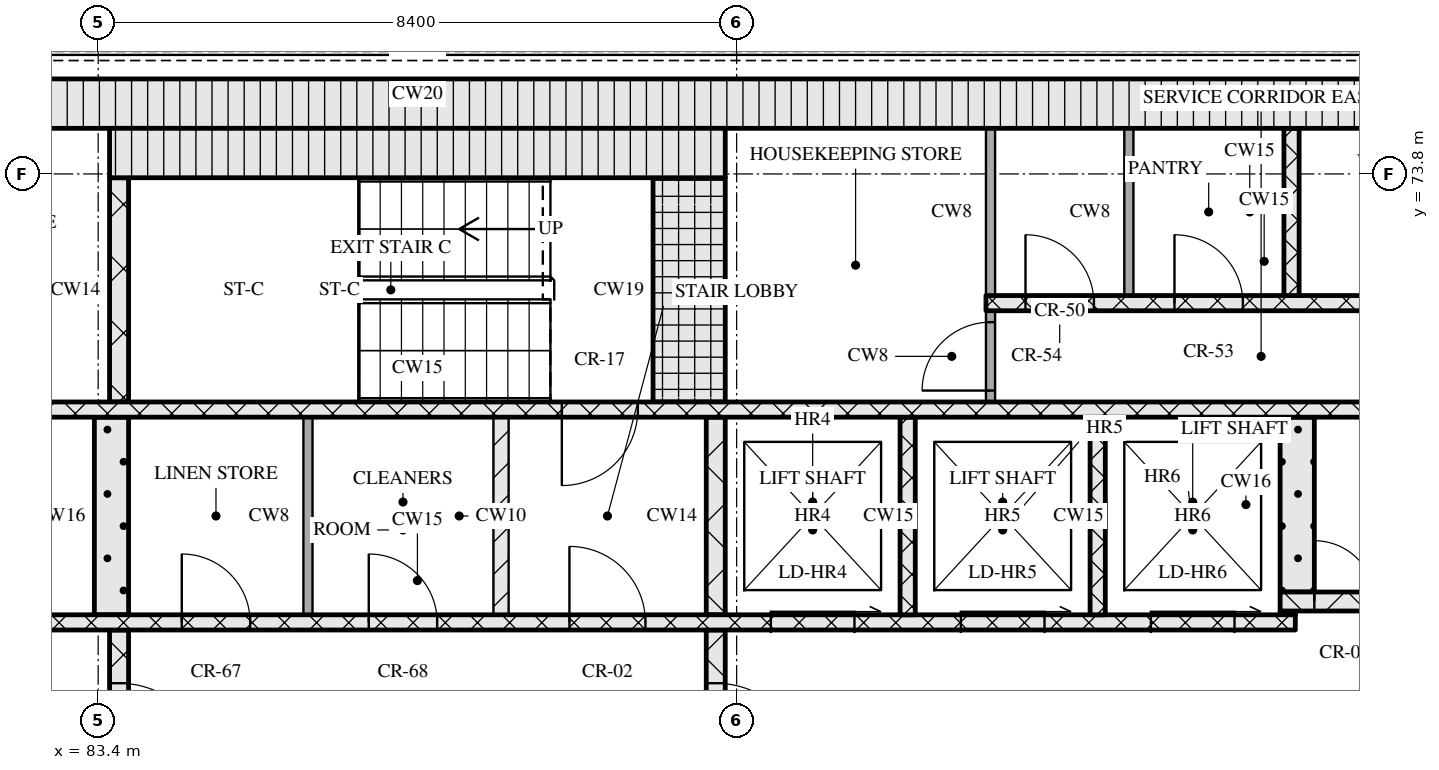
"""IFC4 building model, lengths in metres.
Left out: names, types, materials, properties, quantities, classifications, styles, units other than length and angle.
Written with IfcOpenShell. Run it as: python <this file> out.ifc"""

import sys

from ifc_helpers import new_model, si_unit, direction, frame, frame_2d, origin, place, context, subcontext, project, spatial, rectangle, extrude, element, fill, save


model = new_model("IFC4")
c1 = context("Model", 3, precision=1e-05, world=origin(), true_north=direction((0.0, 1.0)))
c2 = subcontext(c1, "Body", "Model", "MODEL_VIEW")
j1 = project(units=[si_unit("LENGTHUNIT", "METRE"), si_unit("PLANEANGLEUNIT", "RADIAN")], contexts=[c1])
p1 = place(None, origin())
s1 = spatial("IfcSite", under=j1, at=p1, CompositionType="ELEMENT")
p2 = place(p1, origin())
s2 = spatial("IfcBuilding", under=s1, at=p2, CompositionType="ELEMENT")
p3 = place(p2, frame((0.0, 0.0, 227.1)))
s3 = spatial("IfcBuildingStorey", under=s2, at=p3, CompositionType="ELEMENT", Elevation=227.1)
p4 = place(p3, frame((67.15, 74.725, 0.0), z_axis=(0.0, 0.0, 1.0), x_axis=(1.0, 0.0, 0.0)))
e1 = element("IfcWall", 1, at=p4, inside=s3, PredefinedType="SOLIDWALL", context=c2, shape_type="SweptSolid", body=[
    extrude(rectangle(XDim=40.9, YDim=0.65, at=frame_2d((20.45, 0.0))), origin(), (0.0, 0.0, 1.0), 3.32),
])
p5 = place(p3, frame((83.675, 65.2, 0.0), z_axis=(0.0, 0.0, 1.0), x_axis=(0.0, 1.0, 0.0)))
e2 = element("IfcWall", 2, at=p5, inside=s3, PredefinedType="SOLIDWALL", context=c2, shape_type="SweptSolid", body=[
    extrude(rectangle(XDim=2.6, YDim=0.25, at=frame_2d((1.3, 0.0))), origin(), (0.0, 0.0, 1.0), 3.32),
])
p6 = place(p5, frame((0.7, 0.0, 0.0)))
e3 = element("IfcOpeningElement", 3, at=p6, cuts=e2, PredefinedType="OPENING", context=c2, shape_type="SweptSolid", body=[
    extrude(rectangle(XDim=1.2, YDim=2.1, at=frame_2d((0.6, 1.05))), frame((0.0, 0.135, 0.0), z_axis=(0.0, -1.0, 0.0), x_axis=(1.0, 0.0, 0.0)), (0.0, 0.0, 1.0), 0.27),
])
p7 = place(p3, frame((91.525, 65.2, 0.0), z_axis=(0.0, 0.0, 1.0), x_axis=(0.0, 1.0, 0.0)))
e4 = element("IfcWall", 4, at=p7, inside=s3, PredefinedType="SOLIDWALL", context=c2, shape_type="SweptSolid", body=[
    extrude(rectangle(XDim=2.6, YDim=0.25, at=frame_2d((1.3, 0.0))), origin(), (0.0, 0.0, 1.0), 3.32),
])
p8 = place(p7, frame((0.7, 0.0, 0.0)))
e5 = element("IfcOpeningElement", 5, at=p8, cuts=e4, PredefinedType="OPENING", context=c2, shape_type="SweptSolid", body=[
    extrude(rectangle(XDim=1.2, YDim=2.1, at=frame_2d((0.6, 1.05))), frame((0.0, 0.135, 0.0), z_axis=(0.0, -1.0, 0.0), x_axis=(1.0, 0.0, 0.0)), (0.0, 0.0, 1.0), 0.27),
])
p9 = place(p3, frame((76.05, 67.9, 0.0), z_axis=(0.0, 0.0, 1.0), x_axis=(1.0, 0.0, 0.0)))
e6 = element("IfcWall", 6, at=p9, inside=s3, PredefinedType="SOLIDWALL", context=c2, shape_type="SweptSolid", body=[
    extrude(rectangle(XDim=23.1, YDim=0.2, at=frame_2d((11.55, 0.0))), origin(), (0.0, 0.0, 1.0), 3.32),
])
p10 = place(p9, frame((1.35, 0.0, 0.0)))
e7 = element("IfcOpeningElement", 7, at=p10, cuts=e6, PredefinedType="OPENING", context=c2, shape_type="SweptSolid", body=[
    extrude(rectangle(XDim=0.9, YDim=2.1, at=frame_2d((0.45, 1.05))), frame((0.0, 0.11, 0.0), z_axis=(0.0, -1.0, 0.0), x_axis=(1.0, 0.0, 0.0)), (0.0, 0.0, 1.0), 0.22),
])
p11 = place(p9, frame((5.06, 0.0, 0.0)))
e8 = element("IfcOpeningElement", 8, at=p11, cuts=e6, PredefinedType="OPENING", context=c2, shape_type="SweptSolid", body=[
    extrude(rectangle(XDim=0.9, YDim=2.1, at=frame_2d((0.45, 1.05))), frame((0.0, 0.11, 0.0), z_axis=(0.0, -1.0, 0.0), x_axis=(1.0, 0.0, 0.0)), (0.0, 0.0, 1.0), 0.22),
])
p12 = place(p9, frame((8.45, 0.0, 0.0)))
e9 = element("IfcOpeningElement", 9, at=p12, cuts=e6, PredefinedType="OPENING", context=c2, shape_type="SweptSolid", body=[
    extrude(rectangle(XDim=0.9, YDim=2.1, at=frame_2d((0.45, 1.05))), frame((0.0, 0.11, 0.0), z_axis=(0.0, -1.0, 0.0), x_axis=(1.0, 0.0, 0.0)), (0.0, 0.0, 1.0), 0.22),
])
p13 = place(p9, frame((10.91, 0.0, 0.0)))
e10 = element("IfcOpeningElement", 10, at=p13, cuts=e6, PredefinedType="OPENING", context=c2, shape_type="SweptSolid", body=[
    extrude(rectangle(XDim=0.9, YDim=2.1, at=frame_2d((0.45, 1.05))), frame((0.0, 0.11, 0.0), z_axis=(0.0, -1.0, 0.0), x_axis=(1.0, 0.0, 0.0)), (0.0, 0.0, 1.0), 0.22),
])
p14 = place(p9, frame((13.55, 0.0, 0.0)))
e11 = element("IfcOpeningElement", 11, at=p14, cuts=e6, PredefinedType="OPENING", context=c2, shape_type="SweptSolid", body=[
    extrude(rectangle(XDim=1.0, YDim=2.1, at=frame_2d((0.5, 1.05))), frame((0.0, 0.11, 0.0), z_axis=(0.0, -1.0, 0.0), x_axis=(1.0, 0.0, 0.0)), (0.0, 0.0, 1.0), 0.22),
])
p15 = place(p9, frame((16.2, 0.0, 0.0)))
e12 = element("IfcOpeningElement", 12, at=p15, cuts=e6, PredefinedType="OPENING", context=c2, shape_type="SweptSolid", body=[
    extrude(rectangle(XDim=1.1, YDim=2.1, at=frame_2d((0.55, 1.05))), frame((0.0, 0.11, 0.0), z_axis=(0.0, -1.0, 0.0), x_axis=(1.0, 0.0, 0.0)), (0.0, 0.0, 1.0), 0.22),
])
p16 = place(p9, frame((18.7, 0.0, 0.0)))
e13 = element("IfcOpeningElement", 13, at=p16, cuts=e6, PredefinedType="OPENING", context=c2, shape_type="SweptSolid", body=[
    extrude(rectangle(XDim=1.1, YDim=2.1, at=frame_2d((0.55, 1.05))), frame((0.0, 0.11, 0.0), z_axis=(0.0, -1.0, 0.0), x_axis=(1.0, 0.0, 0.0)), (0.0, 0.0, 1.0), 0.22),
])
p17 = place(p9, frame((21.2, 0.0, 0.0)))
e14 = element("IfcOpeningElement", 14, at=p17, cuts=e6, PredefinedType="OPENING", context=c2, shape_type="SweptSolid", body=[
    extrude(rectangle(XDim=1.1, YDim=2.1, at=frame_2d((0.55, 1.05))), frame((0.0, 0.11, 0.0), z_axis=(0.0, -1.0, 0.0), x_axis=(1.0, 0.0, 0.0)), (0.0, 0.0, 1.0), 0.22),
])
p18 = place(p3, frame((83.575, 68.0, 0.0), z_axis=(0.0, 0.0, 1.0), x_axis=(0.0, 1.0, 0.0)))
e15 = element("IfcWall", 15, at=p18, inside=s3, PredefinedType="SOLIDWALL", context=c2, shape_type="SweptSolid", body=[
    extrude(rectangle(XDim=2.6, YDim=0.45, at=frame_2d((1.3, 0.0))), origin(), (0.0, 0.0, 1.0), 3.32),
])
p19 = place(p3, frame((86.16, 68.0, 0.0), z_axis=(0.0, 0.0, 1.0), x_axis=(0.0, 1.0, 0.0)))
e16 = element("IfcWall", 16, at=p19, inside=s3, PredefinedType="PARTITIONING", context=c2, shape_type="SweptSolid", body=[
    extrude(rectangle(XDim=2.6, YDim=0.12, at=frame_2d((1.3, 0.0))), origin(), (0.0, 0.0, 1.0), 3.32),
])
p20 = place(p3, frame((88.7, 68.0, 0.0), z_axis=(0.0, 0.0, 1.0), x_axis=(0.0, 1.0, 0.0)))
e17 = element("IfcWall", 17, at=p20, inside=s3, PredefinedType="PARTITIONING", context=c2, shape_type="SweptSolid", body=[
    extrude(rectangle(XDim=2.6, YDim=0.2, at=frame_2d((1.3, 0.0))), origin(), (0.0, 0.0, 1.0), 3.32),
])
p21 = place(p3, frame((91.525, 68.0, 0.0), z_axis=(0.0, 0.0, 1.0), x_axis=(0.0, 1.0, 0.0)))
e18 = element("IfcWall", 18, at=p21, inside=s3, PredefinedType="SOLIDWALL", context=c2, shape_type="SweptSolid", body=[
    extrude(rectangle(XDim=2.6, YDim=0.25, at=frame_2d((1.3, 0.0))), origin(), (0.0, 0.0, 1.0), 3.32),
])
for number, where, z_axis, x_axis in (
    (19, (94.05, 68.0, 0.0), (0.0, 0.0, 1.0), (0.0, 1.0, 0.0)),
    (20, (96.55, 68.0, 0.0), (0.0, 0.0, 1.0), (0.0, 1.0, 0.0)),
):
    element("IfcWall", number, at=place(p3, frame(where, z_axis=z_axis, x_axis=x_axis)), inside=s3, PredefinedType="SOLIDWALL", context=c2, shape_type="SweptSolid", body=[
        extrude(rectangle(XDim=2.6, YDim=0.2, at=frame_2d((1.3, 0.0))), origin(), (0.0, 0.0, 1.0), 3.32),
    ])
p22 = place(p3, frame((98.95, 68.025, 0.0), z_axis=(0.0, 0.0, 1.0), x_axis=(1.0, 0.0, 0.0)))
e21 = element("IfcWall", 21, at=p22, inside=s3, PredefinedType="SOLIDWALL", context=c2, shape_type="SweptSolid", body=[
    extrude(rectangle(XDim=0.2, YDim=0.05, at=frame_2d((0.1, 0.0))), origin(), (0.0, 0.0, 1.0), 3.32),
])
p23 = place(p3, frame((98.95, 68.175, 0.0), z_axis=(0.0, 0.0, 1.0), x_axis=(1.0, 0.0, 0.0)))
e22 = element("IfcWall", 22, at=p23, inside=s3, PredefinedType="SOLIDWALL", context=c2, shape_type="SweptSolid", body=[
    extrude(rectangle(XDim=8.45, YDim=0.25, at=frame_2d((4.225, 0.0))), origin(), (0.0, 0.0, 1.0), 3.32),
])
p24 = place(p23, frame((0.45, 0.0, 0.0)))
e23 = element("IfcOpeningElement", 23, at=p24, cuts=e22, PredefinedType="OPENING", context=c2, shape_type="SweptSolid", body=[
    extrude(rectangle(XDim=0.8, YDim=2.1, at=frame_2d((0.4, 1.05))), frame((0.0, 0.135, 0.0), z_axis=(0.0, -1.0, 0.0), x_axis=(1.0, 0.0, 0.0)), (0.0, 0.0, 1.0), 0.27),
])
p25 = place(p23, frame((1.75, 0.0, 0.0)))
e24 = element("IfcOpeningElement", 24, at=p25, cuts=e22, PredefinedType="OPENING", context=c2, shape_type="SweptSolid", body=[
    extrude(rectangle(XDim=1.0, YDim=2.1, at=frame_2d((0.5, 1.05))), frame((0.0, 0.135, 0.0), z_axis=(0.0, -1.0, 0.0), x_axis=(1.0, 0.0, 0.0)), (0.0, 0.0, 1.0), 0.27),
])
p26 = place(p3, frame((99.175, 68.3, 0.0), z_axis=(0.0, 0.0, 1.0), x_axis=(0.0, 1.0, 0.0)))
e25 = element("IfcWall", 25, at=p26, inside=s3, PredefinedType="SOLIDWALL", context=c2, shape_type="SweptSolid", body=[
    extrude(rectangle(XDim=2.3, YDim=0.45, at=frame_2d((1.15, 0.0))), origin(), (0.0, 0.0, 1.0), 3.32),
])
p27 = place(p3, frame((67.8, 70.7, 0.0), z_axis=(0.0, 0.0, 1.0), x_axis=(1.0, 0.0, 0.0)))
e26 = element("IfcWall", 26, at=p27, inside=s3, PredefinedType="SOLIDWALL", context=c2, shape_type="SweptSolid", body=[
    extrude(rectangle(XDim=39.6, YDim=0.2, at=frame_2d((19.8, 0.0))), origin(), (0.0, 0.0, 1.0), 3.32),
])
p28 = place(p27, frame((0.65, 0.0, 0.0)))
e27 = element("IfcOpeningElement", 27, at=p28, cuts=e26, PredefinedType="OPENING", context=c2, shape_type="SweptSolid", body=[
    extrude(rectangle(XDim=1.1, YDim=2.1, at=frame_2d((0.55, 1.05))), frame((0.0, 0.11, 0.0), z_axis=(0.0, -1.0, 0.0), x_axis=(1.0, 0.0, 0.0)), (0.0, 0.0, 1.0), 0.22),
])
p29 = place(p27, frame((3.25, 0.0, 0.0)))
e28 = element("IfcOpeningElement", 28, at=p29, cuts=e26, PredefinedType="OPENING", context=c2, shape_type="SweptSolid", body=[
    extrude(rectangle(XDim=1.1, YDim=2.1, at=frame_2d((0.55, 1.05))), frame((0.0, 0.11, 0.0), z_axis=(0.0, -1.0, 0.0), x_axis=(1.0, 0.0, 0.0)), (0.0, 0.0, 1.0), 0.22),
])
p30 = place(p27, frame((5.9, 0.0, 0.0)))
e29 = element("IfcOpeningElement", 29, at=p30, cuts=e26, PredefinedType="OPENING", context=c2, shape_type="SweptSolid", body=[
    extrude(rectangle(XDim=1.0, YDim=2.1, at=frame_2d((0.5, 1.05))), frame((0.0, 0.11, 0.0), z_axis=(0.0, -1.0, 0.0), x_axis=(1.0, 0.0, 0.0)), (0.0, 0.0, 1.0), 0.22),
])
p31 = place(p27, frame((21.7, 0.0, 0.0)))
e30 = element("IfcOpeningElement", 30, at=p31, cuts=e26, PredefinedType="OPENING", context=c2, shape_type="SweptSolid", body=[
    extrude(rectangle(XDim=1.0, YDim=2.1, at=frame_2d((0.5, 1.05))), frame((0.0, 0.11, 0.0), z_axis=(0.0, -1.0, 0.0), x_axis=(1.0, 0.0, 0.0)), (0.0, 0.0, 1.0), 0.22),
])
p32 = place(p27, frame((32.7, 0.0, 0.0)))
e31 = element("IfcOpeningElement", 31, at=p32, cuts=e26, PredefinedType="OPENING", context=c2, shape_type="SweptSolid", body=[
    extrude(rectangle(XDim=1.0, YDim=2.1, at=frame_2d((0.5, 1.05))), frame((0.0, 0.11, 0.0), z_axis=(0.0, -1.0, 0.0), x_axis=(1.0, 0.0, 0.0)), (0.0, 0.0, 1.0), 0.22),
])
p33 = place(p27, frame((35.25, 0.0, 0.0)))
e32 = element("IfcOpeningElement", 32, at=p33, cuts=e26, PredefinedType="OPENING", context=c2, shape_type="SweptSolid", body=[
    extrude(rectangle(XDim=1.1, YDim=2.1, at=frame_2d((0.55, 1.05))), frame((0.0, 0.11, 0.0), z_axis=(0.0, -1.0, 0.0), x_axis=(1.0, 0.0, 0.0)), (0.0, 0.0, 1.0), 0.22),
])
p34 = place(p27, frame((37.85, 0.0, 0.0)))
e33 = element("IfcOpeningElement", 33, at=p34, cuts=e26, PredefinedType="OPENING", context=c2, shape_type="SweptSolid", body=[
    extrude(rectangle(XDim=1.1, YDim=2.1, at=frame_2d((0.55, 1.05))), frame((0.0, 0.11, 0.0), z_axis=(0.0, -1.0, 0.0), x_axis=(1.0, 0.0, 0.0)), (0.0, 0.0, 1.0), 0.22),
])
p35 = place(p3, frame((83.675, 70.8, 0.0), z_axis=(0.0, 0.0, 1.0), x_axis=(0.0, 1.0, 0.0)))
e34 = element("IfcWall", 34, at=p35, inside=s3, PredefinedType="SOLIDWALL", context=c2, shape_type="SweptSolid", body=[
    extrude(rectangle(XDim=2.95, YDim=0.25, at=frame_2d((1.475, 0.0))), origin(), (0.0, 0.0, 1.0), 3.32),
])
p36 = place(p3, frame((91.175, 70.8, 0.0), z_axis=(0.0, 0.0, 1.0), x_axis=(0.0, 1.0, 0.0)))
e35 = element("IfcWall", 35, at=p36, inside=s3, PredefinedType="SOLIDWALL", context=c2, shape_type="SweptSolid", body=[
    extrude(rectangle(XDim=2.95, YDim=0.95, at=frame_2d((1.475, 0.0))), origin(), (0.0, 0.0, 1.0), 3.32),
])
p37 = place(p3, frame((95.14, 70.8, 0.0), z_axis=(0.0, 0.0, 1.0), x_axis=(0.0, 1.0, 0.0)))
e36 = element("IfcWall", 36, at=p37, inside=s3, PredefinedType="PARTITIONING", context=c2, shape_type="SweptSolid", body=[
    extrude(rectangle(XDim=1.2, YDim=0.12, at=frame_2d((0.6, 0.0))), origin(), (0.0, 0.0, 1.0), 3.32),
])
p38 = place(p37, frame((0.15, 0.0, 0.0)))
e37 = element("IfcOpeningElement", 37, at=p38, cuts=e36, PredefinedType="OPENING", context=c2, shape_type="SweptSolid", body=[
    extrude(rectangle(XDim=0.9, YDim=2.1, at=frame_2d((0.45, 1.05))), frame((0.0, 0.07, 0.0), z_axis=(0.0, -1.0, 0.0), x_axis=(1.0, 0.0, 0.0)), (0.0, 0.0, 1.0), 0.14),
])
p39 = place(p3, frame((95.08, 72.1, 0.0), z_axis=(0.0, 0.0, 1.0), x_axis=(1.0, 0.0, 0.0)))
e38 = element("IfcWall", 38, at=p39, inside=s3, PredefinedType="SOLIDWALL", context=c2, shape_type="SweptSolid", body=[
    extrude(rectangle(XDim=7.32, YDim=0.2, at=frame_2d((3.66, 0.0))), origin(), (0.0, 0.0, 1.0), 3.32),
])
p40 = place(p39, frame((0.52, 0.0, 0.0)))
e39 = element("IfcOpeningElement", 39, at=p40, cuts=e38, PredefinedType="OPENING", context=c2, shape_type="SweptSolid", body=[
    extrude(rectangle(XDim=0.9, YDim=2.1, at=frame_2d((0.45, 1.05))), frame((0.0, 0.11, 0.0), z_axis=(0.0, -1.0, 0.0), x_axis=(1.0, 0.0, 0.0)), (0.0, 0.0, 1.0), 0.22),
])
p41 = place(p39, frame((2.48, 0.0, 0.0)))
e40 = element("IfcOpeningElement", 40, at=p41, cuts=e38, PredefinedType="OPENING", context=c2, shape_type="SweptSolid", body=[
    extrude(rectangle(XDim=0.9, YDim=2.1, at=frame_2d((0.45, 1.05))), frame((0.0, 0.11, 0.0), z_axis=(0.0, -1.0, 0.0), x_axis=(1.0, 0.0, 0.0)), (0.0, 0.0, 1.0), 0.22),
])
p42 = place(p39, frame((5.17, 0.0, 0.0)))
e41 = element("IfcOpeningElement", 41, at=p42, cuts=e38, PredefinedType="OPENING", context=c2, shape_type="SweptSolid", body=[
    extrude(rectangle(XDim=0.9, YDim=2.1, at=frame_2d((0.45, 1.05))), frame((0.0, 0.11, 0.0), z_axis=(0.0, -1.0, 0.0), x_axis=(1.0, 0.0, 0.0)), (0.0, 0.0, 1.0), 0.22),
])
for number, where, z_axis, x_axis in (
    (42, (95.14, 72.2, 0.0), (0.0, 0.0, 1.0), (0.0, 1.0, 0.0)),
    (43, (96.96, 72.2, 0.0), (0.0, 0.0, 1.0), (0.0, 1.0, 0.0)),
):
    element("IfcWall", number, at=place(p3, frame(where, z_axis=z_axis, x_axis=x_axis)), inside=s3, PredefinedType="PARTITIONING", context=c2, shape_type="SweptSolid", body=[
        extrude(rectangle(XDim=2.2, YDim=0.12, at=frame_2d((1.1, 0.0))), origin(), (0.0, 0.0, 1.0), 3.32),
    ])
p43 = place(p3, frame((99.1, 72.2, 0.0), z_axis=(0.0, 0.0, 1.0), x_axis=(0.0, 1.0, 0.0)))
e44 = element("IfcWall", 44, at=p43, inside=s3, PredefinedType="SOLIDWALL", context=c2, shape_type="SweptSolid", body=[
    extrude(rectangle(XDim=2.2, YDim=0.2, at=frame_2d((1.1, 0.0))), origin(), (0.0, 0.0, 1.0), 3.32),
])
p44 = place(p3, frame((83.55, 74.075, 0.0), z_axis=(0.0, 0.0, 1.0), x_axis=(1.0, 0.0, 0.0)))
e45 = element("IfcWall", 45, at=p44, inside=s3, PredefinedType="SOLIDWALL", context=c2, shape_type="SweptSolid", body=[
    extrude(rectangle(XDim=8.1, YDim=0.65, at=frame_2d((4.05, 0.0))), origin(), (0.0, 0.0, 1.0), 3.32),
])
p45 = place(p6, origin())
e46 = element("IfcDoor", 46, at=p45, inside=s3, OperationType="SINGLE_SWING_RIGHT", PredefinedType="DOOR", context=c2, shape_type="SweptSolid", body=[
    extrude(rectangle(XDim=1.2, YDim=2.1, at=frame_2d((0.6, 1.05))), frame((0.0, 0.025, 0.0), z_axis=(0.0, -1.0, 0.0), x_axis=(1.0, 0.0, 0.0)), (0.0, 0.0, 1.0), 0.05),
])
fill(e3, e46)
p46 = place(p8, origin())
e47 = element("IfcDoor", 47, at=p46, inside=s3, OperationType="SINGLE_SWING_RIGHT", PredefinedType="DOOR", context=c2, shape_type="SweptSolid", body=[
    extrude(rectangle(XDim=1.2, YDim=2.1, at=frame_2d((0.6, 1.05))), frame((0.0, 0.025, 0.0), z_axis=(0.0, -1.0, 0.0), x_axis=(1.0, 0.0, 0.0)), (0.0, 0.0, 1.0), 0.05),
])
fill(e5, e47)
p47 = place(p12, origin())
e48 = element("IfcDoor", 48, at=p47, inside=s3, OperationType="SINGLE_SWING_LEFT", PredefinedType="DOOR", context=c2, shape_type="SweptSolid", body=[
    extrude(rectangle(XDim=0.9, YDim=2.1, at=frame_2d((0.45, 1.05))), frame((0.0, 0.025, 0.0), z_axis=(0.0, -1.0, 0.0), x_axis=(1.0, 0.0, 0.0)), (0.0, 0.0, 1.0), 0.05),
])
fill(e9, e48)
p48 = place(p13, origin())
e49 = element("IfcDoor", 49, at=p48, inside=s3, OperationType="SINGLE_SWING_LEFT", PredefinedType="DOOR", context=c2, shape_type="SweptSolid", body=[
    extrude(rectangle(XDim=0.9, YDim=2.1, at=frame_2d((0.45, 1.05))), frame((0.0, 0.025, 0.0), z_axis=(0.0, -1.0, 0.0), x_axis=(1.0, 0.0, 0.0)), (0.0, 0.0, 1.0), 0.05),
])
fill(e10, e49)
p49 = place(p14, origin())
e50 = element("IfcDoor", 50, at=p49, inside=s3, OperationType="SINGLE_SWING_LEFT", PredefinedType="DOOR", context=c2, shape_type="SweptSolid", body=[
    extrude(rectangle(XDim=1.0, YDim=2.1, at=frame_2d((0.5, 1.05))), frame((0.0, 0.025, 0.0), z_axis=(0.0, -1.0, 0.0), x_axis=(1.0, 0.0, 0.0)), (0.0, 0.0, 1.0), 0.05),
])
fill(e11, e50)
p50 = place(p15, origin())
e51 = element("IfcDoor", 51, at=p50, inside=s3, OperationType="SLIDING_TO_RIGHT", PredefinedType="DOOR", context=c2, shape_type="SweptSolid", body=[
    extrude(rectangle(XDim=1.1, YDim=2.1, at=frame_2d((0.55, 1.05))), frame((0.0, 0.025, 0.0), z_axis=(0.0, -1.0, 0.0), x_axis=(1.0, 0.0, 0.0)), (0.0, 0.0, 1.0), 0.05),
])
fill(e12, e51)
p51 = place(p16, origin())
e52 = element("IfcDoor", 52, at=p51, inside=s3, OperationType="SLIDING_TO_RIGHT", PredefinedType="DOOR", context=c2, shape_type="SweptSolid", body=[
    extrude(rectangle(XDim=1.1, YDim=2.1, at=frame_2d((0.55, 1.05))), frame((0.0, 0.025, 0.0), z_axis=(0.0, -1.0, 0.0), x_axis=(1.0, 0.0, 0.0)), (0.0, 0.0, 1.0), 0.05),
])
fill(e13, e52)
p52 = place(p17, origin())
e53 = element("IfcDoor", 53, at=p52, inside=s3, OperationType="SLIDING_TO_RIGHT", PredefinedType="DOOR", context=c2, shape_type="SweptSolid", body=[
    extrude(rectangle(XDim=1.1, YDim=2.1, at=frame_2d((0.55, 1.05))), frame((0.0, 0.025, 0.0), z_axis=(0.0, -1.0, 0.0), x_axis=(1.0, 0.0, 0.0)), (0.0, 0.0, 1.0), 0.05),
])
fill(e14, e53)
p53 = place(p24, origin())
e54 = element("IfcDoor", 54, at=p53, inside=s3, OperationType="SINGLE_SWING_LEFT", PredefinedType="DOOR", context=c2, shape_type="SweptSolid", body=[
    extrude(rectangle(XDim=0.8, YDim=2.1, at=frame_2d((0.4, 1.05))), frame((0.0, 0.025, 0.0), z_axis=(0.0, -1.0, 0.0), x_axis=(1.0, 0.0, 0.0)), (0.0, 0.0, 1.0), 0.05),
])
fill(e23, e54)
p54 = place(p31, origin())
e55 = element("IfcDoor", 55, at=p54, inside=s3, OperationType="SINGLE_SWING_RIGHT", PredefinedType="DOOR", context=c2, shape_type="SweptSolid", body=[
    extrude(rectangle(XDim=1.0, YDim=2.1, at=frame_2d((0.5, 1.05))), frame((0.0, 0.025, 0.0), z_axis=(0.0, -1.0, 0.0), x_axis=(1.0, 0.0, 0.0)), (0.0, 0.0, 1.0), 0.05),
])
fill(e30, e55)
p55 = place(p38, origin())
e56 = element("IfcDoor", 56, at=p55, inside=s3, OperationType="SINGLE_SWING_LEFT", PredefinedType="DOOR", context=c2, shape_type="SweptSolid", body=[
    extrude(rectangle(XDim=0.9, YDim=2.1, at=frame_2d((0.45, 1.05))), frame((0.0, 0.025, 0.0), z_axis=(0.0, -1.0, 0.0), x_axis=(1.0, 0.0, 0.0)), (0.0, 0.0, 1.0), 0.05),
])
fill(e37, e56)
p56 = place(p40, origin())
e57 = element("IfcDoor", 57, at=p56, inside=s3, OperationType="SINGLE_SWING_LEFT", PredefinedType="DOOR", context=c2, shape_type="SweptSolid", body=[
    extrude(rectangle(XDim=0.9, YDim=2.1, at=frame_2d((0.45, 1.05))), frame((0.0, 0.025, 0.0), z_axis=(0.0, -1.0, 0.0), x_axis=(1.0, 0.0, 0.0)), (0.0, 0.0, 1.0), 0.05),
])
fill(e39, e57)
p57 = place(p41, origin())
e58 = element("IfcDoor", 58, at=p57, inside=s3, OperationType="SINGLE_SWING_LEFT", PredefinedType="DOOR", context=c2, shape_type="SweptSolid", body=[
    extrude(rectangle(XDim=0.9, YDim=2.1, at=frame_2d((0.45, 1.05))), frame((0.0, 0.025, 0.0), z_axis=(0.0, -1.0, 0.0), x_axis=(1.0, 0.0, 0.0)), (0.0, 0.0, 1.0), 0.05),
])
fill(e40, e58)
save(model, sys.argv[1])
